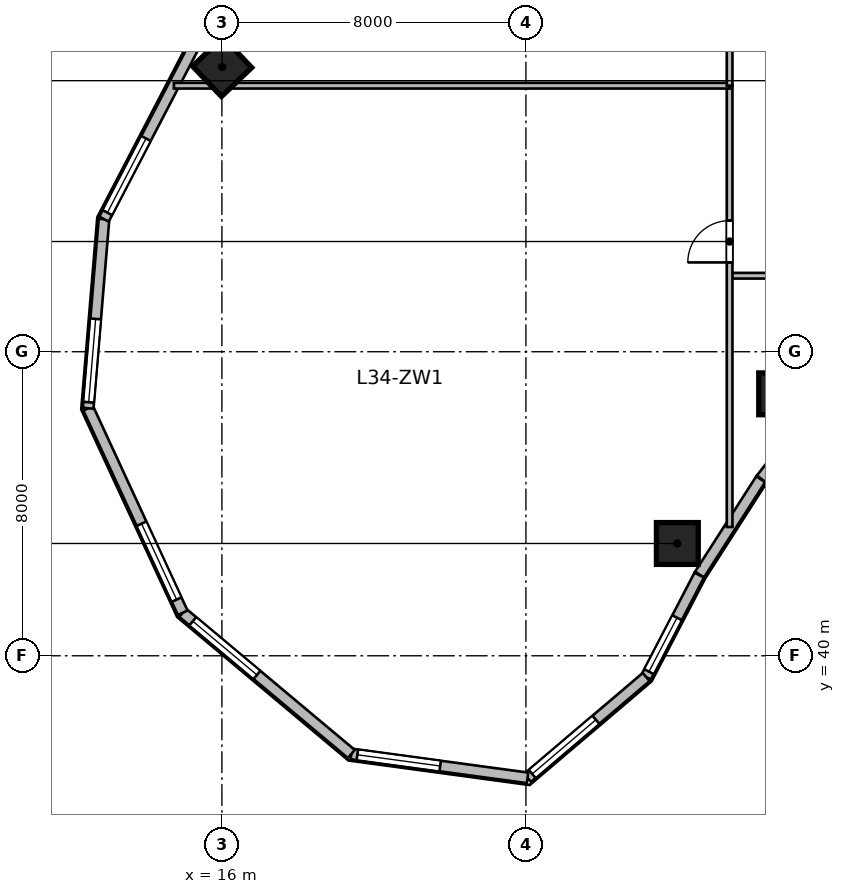
"""IFC4 building model, lengths in metres.
Left out: names, types, materials, properties, quantities, classifications, styles, units other than length and angle.
Written with IfcOpenShell. Run it as: python <this file> out.ifc"""

import sys

from ifc_helpers import new_model, si_unit, direction, frame, frame_2d, origin, origin_2d, place, context, subcontext, project, spatial, rectangle, circle, extrude, source, transform, mapped, element, fill, save


model = new_model("IFC4")
c1 = context("Model", 3, precision=1e-05, world=origin(), true_north=direction((0.0, 1.0)))
c2 = subcontext(c1, "Body", "Model", "MODEL_VIEW")
j1 = project(units=[si_unit("LENGTHUNIT", "METRE"), si_unit("PLANEANGLEUNIT", "RADIAN")], contexts=[c1])
p1 = place(None, origin())
s1 = spatial("IfcSite", under=j1, at=p1, CompositionType="ELEMENT")
p2 = place(p1, origin())
s2 = spatial("IfcBuilding", under=s1, at=p2, CompositionType="ELEMENT")
p3 = place(p2, frame((0.0, 0.0, 142.8)))
s3 = spatial("IfcBuildingStorey", under=s2, at=p3, CompositionType="ELEMENT", Elevation=142.8)
m1 = source(origin(), c2, "Body", "SweptSolid", [
    extrude(circle(Radius=0.55, at=origin_2d()), origin(), (0.0, 0.0, 1.0), 3.9),
])
p4 = place(p3, frame((27.985, 42.955, 0.0), z_axis=(0.0, 0.0, 1.0), x_axis=(-0.690756218984, 0.723087716626, 0.0)))
e1 = element("IfcColumn", 1, at=p4, inside=s3, PredefinedType="COLUMN", context=c2, shape_type="MappedRepresentation", body=[
    mapped(m1, transform((0.0, 0.0, 0.0), scale=1.0)),
])
m2 = source(origin(), c2, "Body", "SweptSolid", [
    extrude(rectangle(XDim=1.1, YDim=1.1, at=origin_2d()), origin(), (0.0, 0.0, 1.0), 3.9),
])
p5 = place(p3, frame((16.007, 55.494, 0.0), z_axis=(0.0, 0.0, 1.0), x_axis=(-0.690756218984, 0.723087716626, 0.0)))
e2 = element("IfcColumn", 2, at=p5, inside=s3, PredefinedType="COLUMN", context=c2, shape_type="MappedRepresentation", body=[
    mapped(m2, transform((0.0, 0.0, 0.0), scale=1.0)),
])
p6 = place(p3, frame((30.677, 46.892, 0.0), z_axis=(0.0, 0.0, 1.0), x_axis=(-0.571143442153, 0.820850271661, 0.0)))
e3 = element("IfcColumn", 3, at=p6, inside=s3, PredefinedType="COLUMN", context=c2, shape_type="MappedRepresentation", body=[
    mapped(m1, transform((0.0, 0.0, 0.0), scale=1.0)),
])
m3 = source(origin(), c2, "Body", "SweptSolid", [
    extrude(rectangle(XDim=2.897, YDim=0.28, at=frame_2d((1.448, 0.0))), origin(), (0.0, 0.0, 1.0), 3.65),
])
p7 = place(p3, frame((31.979, 46.936, 0.0), z_axis=(0.0, 0.0, 1.0), x_axis=(-0.618167636915, -0.786046291685, 0.0)))
e4 = element("IfcWall", 4, at=p7, inside=s3, PredefinedType="SOLIDWALL", context=c2, shape_type="MappedRepresentation", body=[
    mapped(m3, transform((0.0, 0.0, 0.0), scale=1.0)),
])
m4 = source(origin(), c2, "Body", "SweptSolid", [
    extrude(rectangle(XDim=2.981, YDim=0.28, at=frame_2d((1.49, 0.0))), origin(), (0.0, 0.0, 1.0), 3.65),
])
p8 = place(p3, frame((30.179, 44.645, 0.0), z_axis=(0.0, 0.0, 1.0), x_axis=(-0.540194451908, -0.841540227278, 0.0)))
e5 = element("IfcWall", 5, at=p8, inside=s3, PredefinedType="SOLIDWALL", context=c2, shape_type="MappedRepresentation", body=[
    mapped(m4, transform((0.0, 0.0, 0.0), scale=1.0)),
])
m5 = source(origin(), c2, "Body", "SweptSolid", [
    extrude(rectangle(XDim=3.024, YDim=0.28, at=frame_2d((1.512, 0.0))), origin(), (0.0, 0.0, 1.0), 3.65),
])
p9 = place(p3, frame((28.561, 42.123, 0.0), z_axis=(0.0, 0.0, 1.0), x_axis=(-0.461718746531, -0.887026380161, 0.0)))
e6 = element("IfcWall", 6, at=p9, inside=s3, PredefinedType="SOLIDWALL", context=c2, shape_type="MappedRepresentation", body=[
    mapped(m5, transform((0.0, 0.0, 0.0), scale=1.0)),
])
p10 = place(p9, frame((1.264, 0.0, 0.95)))
e7 = element("IfcOpeningElement", 7, at=p10, cuts=e6, PredefinedType="OPENING", context=c2, shape_type="SweptSolid", body=[
    extrude(rectangle(XDim=1.6, YDim=1.9, at=frame_2d((0.8, 0.95))), frame((0.0, 0.15, 0.0), z_axis=(0.0, -1.0, 0.0), x_axis=(1.0, 0.0, 0.0)), (0.0, 0.0, 1.0), 0.3),
])
m6 = source(origin(), c2, "Body", "SweptSolid", [
    extrude(rectangle(XDim=4.096, YDim=0.28, at=frame_2d((2.048, 0.0))), origin(), (0.0, 0.0, 1.0), 3.65),
])
p11 = place(p3, frame((27.164, 39.44, 0.0), z_axis=(0.0, 0.0, 1.0), x_axis=(-0.761926081737, -0.647663991564, 0.0)))
e8 = element("IfcWall", 8, at=p11, inside=s3, PredefinedType="SOLIDWALL", context=c2, shape_type="MappedRepresentation", body=[
    mapped(m6, transform((0.0, 0.0, 0.0), scale=1.0)),
])
p12 = place(p11, frame((1.736, 0.0, 0.95)))
e9 = element("IfcOpeningElement", 9, at=p12, cuts=e8, PredefinedType="OPENING", context=c2, shape_type="SweptSolid", body=[
    extrude(rectangle(XDim=2.2, YDim=2.1, at=frame_2d((1.1, 1.05))), frame((0.0, 0.15, 0.0), z_axis=(0.0, -1.0, 0.0), x_axis=(1.0, 0.0, 0.0)), (0.0, 0.0, 1.0), 0.3),
])
m7 = source(origin(), c2, "Body", "SweptSolid", [
    extrude(rectangle(XDim=4.68, YDim=0.28, at=frame_2d((2.34, 0.0))), origin(), (0.0, 0.0, 1.0), 3.65),
])
p13 = place(p3, frame((24.043, 36.788, 0.0), z_axis=(0.0, 0.0, 1.0), x_axis=(-0.990931146435, 0.134370618162, 0.0)))
e10 = element("IfcWall", 10, at=p13, inside=s3, PredefinedType="SOLIDWALL", context=c2, shape_type="MappedRepresentation", body=[
    mapped(m7, transform((0.0, 0.0, 0.0), scale=1.0)),
])
p14 = place(p13, frame((2.32, 0.0, 0.95)))
e11 = element("IfcOpeningElement", 11, at=p14, cuts=e10, PredefinedType="OPENING", context=c2, shape_type="SweptSolid", body=[
    extrude(rectangle(XDim=2.2, YDim=2.1, at=frame_2d((1.1, 1.05))), frame((0.0, 0.15, 0.0), z_axis=(0.0, -1.0, 0.0), x_axis=(1.0, 0.0, 0.0)), (0.0, 0.0, 1.0), 0.3),
])
m8 = source(origin(), c2, "Body", "SweptSolid", [
    extrude(rectangle(XDim=5.786, YDim=0.28, at=frame_2d((2.893, 0.0))), origin(), (0.0, 0.0, 1.0), 3.65),
])
p15 = place(p3, frame((19.406, 37.417, 0.0), z_axis=(0.0, 0.0, 1.0), x_axis=(-0.766711306852, 0.641992034176, 0.0)))
e12 = element("IfcWall", 12, at=p15, inside=s3, PredefinedType="SOLIDWALL", context=c2, shape_type="MappedRepresentation", body=[
    mapped(m8, transform((0.0, 0.0, 0.0), scale=1.0)),
])
p16 = place(p15, frame((3.24, 0.0, 0.95)))
e13 = element("IfcOpeningElement", 13, at=p16, cuts=e12, PredefinedType="OPENING", context=c2, shape_type="SweptSolid", body=[
    extrude(rectangle(XDim=2.2, YDim=2.1, at=frame_2d((1.1, 1.05))), frame((0.0, 0.15, 0.0), z_axis=(0.0, -1.0, 0.0), x_axis=(1.0, 0.0, 0.0)), (0.0, 0.0, 1.0), 0.3),
])
m9 = source(origin(), c2, "Body", "SweptSolid", [
    extrude(rectangle(XDim=5.927, YDim=0.28, at=frame_2d((2.964, 0.0))), origin(), (0.0, 0.0, 1.0), 3.65),
])
p17 = place(p3, frame((14.969, 41.131, 0.0), z_axis=(0.0, 0.0, 1.0), x_axis=(-0.419656204795, 0.907683132914, 0.0)))
e14 = element("IfcWall", 14, at=p17, inside=s3, PredefinedType="SOLIDWALL", context=c2, shape_type="MappedRepresentation", body=[
    mapped(m9, transform((0.0, 0.0, 0.0), scale=1.0)),
])
p18 = place(p17, frame((0.382, 0.0, 0.95)))
e15 = element("IfcOpeningElement", 15, at=p18, cuts=e14, PredefinedType="OPENING", context=c2, shape_type="SweptSolid", body=[
    extrude(rectangle(XDim=2.2, YDim=2.1, at=frame_2d((1.1, 1.05))), frame((0.0, 0.15, 0.0), z_axis=(0.0, -1.0, 0.0), x_axis=(1.0, 0.0, 0.0)), (0.0, 0.0, 1.0), 0.3),
])
m10 = source(origin(), c2, "Body", "SweptSolid", [
    extrude(rectangle(XDim=4.994, YDim=0.28, at=frame_2d((2.497, 0.0))), origin(), (0.0, 0.0, 1.0), 3.65),
])
p19 = place(p3, frame((12.481, 46.512, 0.0), z_axis=(0.0, 0.0, 1.0), x_axis=(0.083344839916, 0.996520766296, 0.0)))
e16 = element("IfcWall", 16, at=p19, inside=s3, PredefinedType="SOLIDWALL", context=c2, shape_type="MappedRepresentation", body=[
    mapped(m10, transform((0.0, 0.0, 0.0), scale=1.0)),
])
p20 = place(p19, frame((0.16, 0.0, 0.95)))
e17 = element("IfcOpeningElement", 17, at=p20, cuts=e16, PredefinedType="OPENING", context=c2, shape_type="SweptSolid", body=[
    extrude(rectangle(XDim=2.2, YDim=2.1, at=frame_2d((1.1, 1.05))), frame((0.0, 0.15, 0.0), z_axis=(0.0, -1.0, 0.0), x_axis=(1.0, 0.0, 0.0)), (0.0, 0.0, 1.0), 0.3),
])
m11 = source(origin(), c2, "Body", "SweptSolid", [
    extrude(rectangle(XDim=5.171, YDim=0.28, at=frame_2d((2.585, 0.0))), origin(), (0.0, 0.0, 1.0), 3.65),
])
p21 = place(p3, frame((12.898, 51.489, 0.0), z_axis=(0.0, 0.0, 1.0), x_axis=(0.461752581363, 0.887008767491, 0.0)))
e18 = element("IfcWall", 18, at=p21, inside=s3, PredefinedType="SOLIDWALL", context=c2, shape_type="MappedRepresentation", body=[
    mapped(m11, transform((0.0, 0.0, 0.0), scale=1.0)),
])
p22 = place(p21, frame((0.193, 0.0, 0.95)))
e19 = element("IfcOpeningElement", 19, at=p22, cuts=e18, PredefinedType="OPENING", context=c2, shape_type="SweptSolid", body=[
    extrude(rectangle(XDim=2.2, YDim=2.1, at=frame_2d((1.1, 1.05))), frame((0.0, 0.15, 0.0), z_axis=(0.0, -1.0, 0.0), x_axis=(1.0, 0.0, 0.0)), (0.0, 0.0, 1.0), 0.3),
])
m12 = source(origin(), c2, "Body", "SweptSolid", [
    extrude(rectangle(XDim=2.5, YDim=0.15, at=frame_2d((1.25, 0.0))), origin(), (0.0, 0.0, 1.0), 3.65),
])
p23 = place(p3, frame((29.4, 50.0, 0.0), z_axis=(0.0, 0.0, 1.0), x_axis=(1.0, 0.0, 0.0)))
e20 = element("IfcWall", 20, at=p23, inside=s3, PredefinedType="PARTITIONING", context=c2, shape_type="MappedRepresentation", body=[
    mapped(m12, transform((0.0, 0.0, 0.0), scale=1.0)),
])
m13 = source(origin(), c2, "Body", "SweptSolid", [
    extrude(rectangle(XDim=11.612, YDim=0.15, at=frame_2d((5.806, 0.0))), origin(), (0.0, 0.0, 1.0), 2.942),
])
p24 = place(p3, frame((29.36, 43.388, 0.0), z_axis=(0.0, 0.0, 1.0), x_axis=(0.0, 1.0, 0.0)))
e21 = element("IfcWall", 21, at=p24, inside=s3, PredefinedType="PARTITIONING", context=c2, shape_type="MappedRepresentation", body=[
    mapped(m13, transform((0.0, 0.0, 0.0), scale=1.0)),
])
p25 = place(p24, frame((6.962, 0.0, 0.0)))
e22 = element("IfcOpeningElement", 22, at=p25, cuts=e21, PredefinedType="OPENING", context=c2, shape_type="SweptSolid", body=[
    extrude(rectangle(XDim=1.1, YDim=2.15, at=frame_2d((0.55, 1.075))), frame((0.0, 0.085, 0.0), z_axis=(0.0, -1.0, 0.0), x_axis=(1.0, 0.0, 0.0)), (0.0, 0.0, 1.0), 0.17),
])
m14 = source(origin(), c2, "Body", "SweptSolid", [
    extrude(rectangle(XDim=14.623, YDim=0.15, at=frame_2d((7.312, 0.0))), origin(), (0.0, 0.0, 1.0), 3.65),
])
p26 = place(p3, frame((14.737, 55.0, 0.0), z_axis=(0.0, 0.0, 1.0), x_axis=(1.0, 0.0, 0.0)))
e23 = element("IfcWall", 23, at=p26, inside=s3, PredefinedType="PARTITIONING", context=c2, shape_type="MappedRepresentation", body=[
    mapped(m14, transform((0.0, 0.0, 0.0), scale=1.0)),
])
m15 = source(origin(), c2, "Body", "SweptSolid", [
    extrude(rectangle(XDim=8.5, YDim=0.15, at=frame_2d((4.25, 0.0))), origin(), (0.0, 0.0, 1.0), 2.942),
])
p27 = place(p3, frame((29.36, 55.0, 0.0), z_axis=(0.0, 0.0, 1.0), x_axis=(0.0, 1.0, 0.0)))
e24 = element("IfcWall", 24, at=p27, inside=s3, PredefinedType="PARTITIONING", context=c2, shape_type="MappedRepresentation", body=[
    mapped(m15, transform((0.0, 0.0, 0.0), scale=1.0)),
])
p28 = place(p27, frame((3.7, 0.0, 0.0)))
e25 = element("IfcOpeningElement", 25, at=p28, cuts=e24, PredefinedType="OPENING", context=c2, shape_type="SweptSolid", body=[
    extrude(rectangle(XDim=1.1, YDim=2.15, at=frame_2d((0.55, 1.075))), frame((0.0, 0.085, 0.0), z_axis=(0.0, -1.0, 0.0), x_axis=(1.0, 0.0, 0.0)), (0.0, 0.0, 1.0), 0.17),
])
m16 = source(origin(), c2, "Body", "SweptSolid", [
    extrude(rectangle(XDim=1.6, YDim=1.9, at=frame_2d((0.8, 0.95))), frame((0.0, 0.03, 0.0), z_axis=(0.0, -1.0, 0.0), x_axis=(1.0, 0.0, 0.0)), (0.0, 0.0, 1.0), 0.06),
])
p29 = place(p10, origin())
e26 = element("IfcWindow", 26, at=p29, inside=s3, PartitioningType="SINGLE_PANEL", PredefinedType="WINDOW", context=c2, shape_type="MappedRepresentation", body=[
    mapped(m16, transform((0.0, 0.0, 0.0), scale=1.0)),
])
fill(e7, e26)
m17 = source(origin(), c2, "Body", "SweptSolid", [
    extrude(rectangle(XDim=2.2, YDim=2.1, at=frame_2d((1.1, 1.05))), frame((0.0, 0.03, 0.0), z_axis=(0.0, -1.0, 0.0), x_axis=(1.0, 0.0, 0.0)), (0.0, 0.0, 1.0), 0.06),
])
p30 = place(p12, origin())
e27 = element("IfcWindow", 27, at=p30, inside=s3, PartitioningType="TRIPLE_PANEL_VERTICAL", PredefinedType="WINDOW", context=c2, shape_type="MappedRepresentation", body=[
    mapped(m17, transform((0.0, 0.0, 0.0), scale=1.0)),
])
fill(e9, e27)
p31 = place(p14, origin())
e28 = element("IfcWindow", 28, at=p31, inside=s3, PartitioningType="TRIPLE_PANEL_VERTICAL", PredefinedType="WINDOW", context=c2, shape_type="MappedRepresentation", body=[
    mapped(m17, transform((0.0, 0.0, 0.0), scale=1.0)),
])
fill(e11, e28)
p32 = place(p16, origin())
e29 = element("IfcWindow", 29, at=p32, inside=s3, PartitioningType="TRIPLE_PANEL_VERTICAL", PredefinedType="WINDOW", context=c2, shape_type="MappedRepresentation", body=[
    mapped(m17, transform((0.0, 0.0, 0.0), scale=1.0)),
])
fill(e13, e29)
p33 = place(p18, origin())
e30 = element("IfcWindow", 30, at=p33, inside=s3, PartitioningType="TRIPLE_PANEL_VERTICAL", PredefinedType="WINDOW", context=c2, shape_type="MappedRepresentation", body=[
    mapped(m17, transform((0.0, 0.0, 0.0), scale=1.0)),
])
fill(e15, e30)
p34 = place(p20, origin())
e31 = element("IfcWindow", 31, at=p34, inside=s3, PartitioningType="TRIPLE_PANEL_VERTICAL", PredefinedType="WINDOW", context=c2, shape_type="MappedRepresentation", body=[
    mapped(m17, transform((0.0, 0.0, 0.0), scale=1.0)),
])
fill(e17, e31)
p35 = place(p22, origin())
e32 = element("IfcWindow", 32, at=p35, inside=s3, PartitioningType="TRIPLE_PANEL_VERTICAL", PredefinedType="WINDOW", context=c2, shape_type="MappedRepresentation", body=[
    mapped(m17, transform((0.0, 0.0, 0.0), scale=1.0)),
])
fill(e19, e32)
m18 = source(origin(), c2, "Body", "SweptSolid", [
    extrude(rectangle(XDim=1.1, YDim=2.15, at=frame_2d((0.55, 1.075))), frame((0.0, 0.025, 0.0), z_axis=(0.0, -1.0, 0.0), x_axis=(1.0, 0.0, 0.0)), (0.0, 0.0, 1.0), 0.05),
])
p36 = place(p25, origin())
e33 = element("IfcDoor", 33, at=p36, inside=s3, OperationType="SINGLE_SWING_LEFT", PredefinedType="DOOR", context=c2, shape_type="MappedRepresentation", body=[
    mapped(m18, transform((0.0, 0.0, 0.0), scale=1.0)),
])
fill(e22, e33)
save(model, sys.argv[1])
